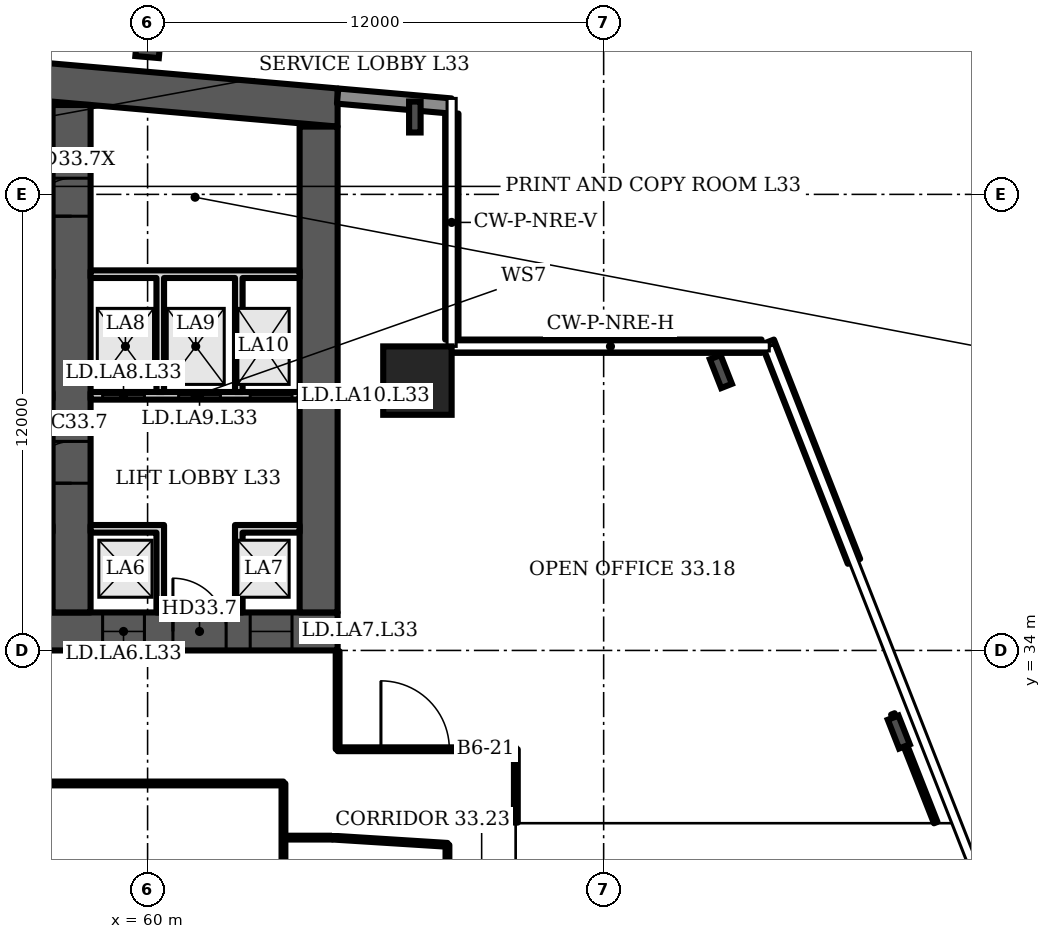
"""IFC4 building model, lengths in metres.
Left out: names, types, materials, properties, quantities, classifications, styles, units other than length and angle.
Written with IfcOpenShell. Run it as: python <this file> out.ifc"""

import sys

from ifc_helpers import new_model, si_unit, direction, frame, frame_2d, origin, origin_2d, place, context, subcontext, project, spatial, polyline, rectangle, i_section, outline, extrude, element, fill, save


model = new_model("IFC4")
c1 = context("Model", 3, precision=1e-05, world=origin(), true_north=direction((0.0, 1.0)))
c2 = subcontext(c1, "Body", "Model", "MODEL_VIEW")
j1 = project(units=[si_unit("LENGTHUNIT", "METRE"), si_unit("PLANEANGLEUNIT", "RADIAN")], contexts=[c1])
p1 = place(None, origin())
s1 = spatial("IfcSite", under=j1, at=p1, CompositionType="ELEMENT")
p2 = place(p1, origin())
s2 = spatial("IfcBuilding", under=s1, at=p2, CompositionType="ELEMENT")
p3 = place(p2, frame((0.0, 0.0, 139.9)))
s3 = spatial("IfcBuildingStorey", under=s2, at=p3, CompositionType="ELEMENT", Elevation=139.9)
p4 = place(p3, origin())
e1 = element("IfcWall", 1, at=p4, inside=s3, PredefinedType="SHEAR", context=c2, shape_type="SweptSolid", body=[
    extrude(outline(polyline([(16.0, 47.784), (40.5, 49.927), (65.0, 47.784), (65.0, 48.787), (40.5, 50.931), (16.0, 48.787), (16.0, 47.784)])), origin(), (0.0, 0.0, 1.0), 3.6),
])
p5 = place(p3, frame((16.0, 34.5, 0.0), z_axis=(0.0, 0.0, 1.0), x_axis=(1.0, 0.0, 0.0)))
e2 = element("IfcWall", 2, at=p5, inside=s3, PredefinedType="SHEAR", context=c2, shape_type="SweptSolid", body=[
    extrude(rectangle(XDim=49.0, YDim=1.0, at=frame_2d((24.5, 0.0))), origin(), (0.0, 0.0, 1.0), 3.6),
])
p6 = place(p5, frame((1.2, 0.0, 0.0)))
e3 = element("IfcOpeningElement", 3, at=p6, cuts=e2, PredefinedType="OPENING", context=c2, shape_type="SweptSolid", body=[
    extrude(rectangle(XDim=1.1, YDim=2.1, at=frame_2d((0.55, 1.05))), frame((0.0, 0.51, 0.0), z_axis=(0.0, -1.0, 0.0), x_axis=(1.0, 0.0, 0.0)), (0.0, 0.0, 1.0), 1.02),
])
p7 = place(p5, frame((5.083, 0.0, 0.0)))
e4 = element("IfcOpeningElement", 4, at=p7, cuts=e2, PredefinedType="OPENING", context=c2, shape_type="SweptSolid", body=[
    extrude(rectangle(XDim=1.1, YDim=2.1, at=frame_2d((0.55, 1.05))), frame((0.0, 0.51, 0.0), z_axis=(0.0, -1.0, 0.0), x_axis=(1.0, 0.0, 0.0)), (0.0, 0.0, 1.0), 1.02),
])
p8 = place(p5, frame((2.933, 0.0, 0.0)))
e5 = element("IfcOpeningElement", 5, at=p8, cuts=e2, PredefinedType="OPENING", context=c2, shape_type="SweptSolid", body=[
    extrude(rectangle(XDim=1.4, YDim=2.1, at=frame_2d((0.7, 1.05))), frame((0.0, 0.51, 0.0), z_axis=(0.0, -1.0, 0.0), x_axis=(1.0, 0.0, 0.0)), (0.0, 0.0, 1.0), 1.02),
])
p9 = place(p5, frame((7.65, 0.0, 0.0)))
e6 = element("IfcOpeningElement", 6, at=p9, cuts=e2, PredefinedType="OPENING", context=c2, shape_type="SweptSolid", body=[
    extrude(rectangle(XDim=1.2, YDim=2.1, at=frame_2d((0.6, 1.05))), frame((0.0, 0.51, 0.0), z_axis=(0.0, -1.0, 0.0), x_axis=(1.0, 0.0, 0.0)), (0.0, 0.0, 1.0), 1.02),
])
p10 = place(p5, frame((14.817, 0.0, 0.0)))
e7 = element("IfcOpeningElement", 7, at=p10, cuts=e2, PredefinedType="OPENING", context=c2, shape_type="SweptSolid", body=[
    extrude(rectangle(XDim=1.1, YDim=2.1, at=frame_2d((0.55, 1.05))), frame((0.0, 0.51, 0.0), z_axis=(0.0, -1.0, 0.0), x_axis=(1.0, 0.0, 0.0)), (0.0, 0.0, 1.0), 1.02),
])
p11 = place(p5, frame((19.083, 0.0, 0.0)))
e8 = element("IfcOpeningElement", 8, at=p11, cuts=e2, PredefinedType="OPENING", context=c2, shape_type="SweptSolid", body=[
    extrude(rectangle(XDim=1.1, YDim=2.1, at=frame_2d((0.55, 1.05))), frame((0.0, 0.51, 0.0), z_axis=(0.0, -1.0, 0.0), x_axis=(1.0, 0.0, 0.0)), (0.0, 0.0, 1.0), 1.02),
])
p12 = place(p5, frame((16.8, 0.0, 0.0)))
e9 = element("IfcOpeningElement", 9, at=p12, cuts=e2, PredefinedType="OPENING", context=c2, shape_type="SweptSolid", body=[
    extrude(rectangle(XDim=1.4, YDim=2.1, at=frame_2d((0.7, 1.05))), frame((0.0, 0.51, 0.0), z_axis=(0.0, -1.0, 0.0), x_axis=(1.0, 0.0, 0.0)), (0.0, 0.0, 1.0), 1.02),
])
p13 = place(p5, frame((21.817, 0.0, 0.0)))
e10 = element("IfcOpeningElement", 10, at=p13, cuts=e2, PredefinedType="OPENING", context=c2, shape_type="SweptSolid", body=[
    extrude(rectangle(XDim=1.1, YDim=2.1, at=frame_2d((0.55, 1.05))), frame((0.0, 0.51, 0.0), z_axis=(0.0, -1.0, 0.0), x_axis=(1.0, 0.0, 0.0)), (0.0, 0.0, 1.0), 1.02),
])
p14 = place(p5, frame((26.083, 0.0, 0.0)))
e11 = element("IfcOpeningElement", 11, at=p14, cuts=e2, PredefinedType="OPENING", context=c2, shape_type="SweptSolid", body=[
    extrude(rectangle(XDim=1.1, YDim=2.1, at=frame_2d((0.55, 1.05))), frame((0.0, 0.51, 0.0), z_axis=(0.0, -1.0, 0.0), x_axis=(1.0, 0.0, 0.0)), (0.0, 0.0, 1.0), 1.02),
])
p15 = place(p5, frame((33.15, 0.0, 0.0)))
e12 = element("IfcOpeningElement", 12, at=p15, cuts=e2, PredefinedType="OPENING", context=c2, shape_type="SweptSolid", body=[
    extrude(rectangle(XDim=1.2, YDim=2.1, at=frame_2d((0.6, 1.05))), frame((0.0, 0.51, 0.0), z_axis=(0.0, -1.0, 0.0), x_axis=(1.0, 0.0, 0.0)), (0.0, 0.0, 1.0), 1.02),
])
p16 = place(p5, frame((37.8, 0.0, 0.0)))
e13 = element("IfcOpeningElement", 13, at=p16, cuts=e2, PredefinedType="OPENING", context=c2, shape_type="SweptSolid", body=[
    extrude(rectangle(XDim=1.4, YDim=2.1, at=frame_2d((0.7, 1.05))), frame((0.0, 0.51, 0.0), z_axis=(0.0, -1.0, 0.0), x_axis=(1.0, 0.0, 0.0)), (0.0, 0.0, 1.0), 1.02),
])
p17 = place(p5, frame((42.817, 0.0, 0.0)))
e14 = element("IfcOpeningElement", 14, at=p17, cuts=e2, PredefinedType="OPENING", context=c2, shape_type="SweptSolid", body=[
    extrude(rectangle(XDim=1.1, YDim=2.1, at=frame_2d((0.55, 1.05))), frame((0.0, 0.51, 0.0), z_axis=(0.0, -1.0, 0.0), x_axis=(1.0, 0.0, 0.0)), (0.0, 0.0, 1.0), 1.02),
])
p18 = place(p5, frame((46.7, 0.0, 0.0)))
e15 = element("IfcOpeningElement", 15, at=p18, cuts=e2, PredefinedType="OPENING", context=c2, shape_type="SweptSolid", body=[
    extrude(rectangle(XDim=1.1, YDim=2.1, at=frame_2d((0.55, 1.05))), frame((0.0, 0.51, 0.0), z_axis=(0.0, -1.0, 0.0), x_axis=(1.0, 0.0, 0.0)), (0.0, 0.0, 1.0), 1.02),
])
p19 = place(p5, frame((44.667, 0.0, 0.0)))
e16 = element("IfcOpeningElement", 16, at=p19, cuts=e2, PredefinedType="OPENING", context=c2, shape_type="SweptSolid", body=[
    extrude(rectangle(XDim=1.4, YDim=2.1, at=frame_2d((0.7, 1.05))), frame((0.0, 0.51, 0.0), z_axis=(0.0, -1.0, 0.0), x_axis=(1.0, 0.0, 0.0)), (0.0, 0.0, 1.0), 1.02),
])
p20 = place(p3, frame((58.0, 35.0, 0.0), z_axis=(0.0, 0.0, 1.0), x_axis=(0.0, 1.0, 0.0)))
e17 = element("IfcWall", 17, at=p20, inside=s3, PredefinedType="SHEAR", context=c2, shape_type="SweptSolid", body=[
    extrude(rectangle(XDim=13.352, YDim=1.0, at=frame_2d((6.676, 0.0))), origin(), (0.0, 0.0, 1.0), 3.6),
])
p21 = place(p20, frame((10.426, 0.0, 0.0)))
e18 = element("IfcOpeningElement", 18, at=p21, cuts=e17, PredefinedType="OPENING", context=c2, shape_type="SweptSolid", body=[
    extrude(rectangle(XDim=1.0, YDim=2.1, at=frame_2d((0.5, 1.05))), frame((0.0, 0.51, 0.0), z_axis=(0.0, -1.0, 0.0), x_axis=(1.0, 0.0, 0.0)), (0.0, 0.0, 1.0), 1.02),
])
p22 = place(p20, frame((3.4, 0.0, 0.0)))
e19 = element("IfcOpeningElement", 19, at=p22, cuts=e17, PredefinedType="OPENING", context=c2, shape_type="SweptSolid", body=[
    extrude(rectangle(XDim=1.1, YDim=2.1, at=frame_2d((0.55, 1.05))), frame((0.0, 0.51, 0.0), z_axis=(0.0, -1.0, 0.0), x_axis=(1.0, 0.0, 0.0)), (0.0, 0.0, 1.0), 1.02),
])
p23 = place(p3, frame((64.5, 35.0, 0.0), z_axis=(0.0, 0.0, 1.0), x_axis=(0.0, 1.0, 0.0)))
e20 = element("IfcWall", 20, at=p23, inside=s3, PredefinedType="SHEAR", context=c2, shape_type="SweptSolid", body=[
    extrude(rectangle(XDim=12.784, YDim=1.0, at=frame_2d((6.392, 0.0))), origin(), (0.0, 0.0, 1.0), 3.6),
])
p24 = place(p3, frame((67.1, 41.1, 0.0), z_axis=(0.0, 0.0, 1.0), x_axis=(1.0, 0.0, 0.0)))
e21 = element("IfcColumn", 21, at=p24, inside=s3, PredefinedType="COLUMN", context=c2, shape_type="SweptSolid", body=[
    extrude(rectangle(XDim=1.8, YDim=1.8, at=origin_2d()), origin(), (0.0, 0.0, 1.0), 3.6),
])
for number, where, z_axis, x_axis in (
    (22, (79.766, 31.853, 0.0), (0.0, 0.0, 1.0), (0.931, 0.366, 0.0)),
    (23, (75.085, 41.338, 0.0), (0.0, 0.0, 1.0), (0.931, 0.366, 0.0)),
    (24, (67.032, 48.036, 0.0), (0.0, 0.0, 1.0), (1.0, 0.0, 0.0)),
):
    element("IfcColumn", number, at=place(p3, frame(where, z_axis=z_axis, x_axis=x_axis)), inside=s3, PredefinedType="COLUMN", context=c2, shape_type="SweptSolid", body=[
        extrude(i_section(OverallWidth=0.303, OverallDepth=0.814, WebThickness=0.021, FlangeThickness=0.04, FilletRadius=0.03, at=origin_2d()), origin(), (0.0, 0.0, 1.0), 3.6),
    ])
p25 = place(p3, frame((60.0, 49.765, 0.0), z_axis=(0.0, 0.0, 1.0), x_axis=(0.087156, 0.996198, 0.0)))
e25 = element("IfcColumn", 25, at=p25, inside=s3, PredefinedType="COLUMN", context=c2, shape_type="SweptSolid", body=[
    extrude(i_section(OverallWidth=0.305, OverallDepth=0.62, WebThickness=0.021, FlangeThickness=0.04, FilletRadius=0.027, at=origin_2d()), origin(), (0.0, 0.0, 1.0), 3.6),
])
p26 = place(p3, frame((67.983, 48.326, 0.0), z_axis=(0.0, 0.0, 1.0), x_axis=(-0.996194, 0.087168, 0.0)))
e26 = element("IfcWall", 26, at=p26, inside=s3, PredefinedType="SOLIDWALL", context=c2, shape_type="SweptSolid", body=[
    extrude(rectangle(XDim=2.994, YDim=0.4, at=frame_2d((1.497, 0.0))), origin(), (0.0, 0.0, 1.0), 3.2),
])
p27 = place(p3, frame((78.586, 36.344, 0.0), z_axis=(0.0, 0.0, 1.0), x_axis=(-0.365792, 0.930699, 0.0)))
e27 = element("IfcWall", 27, at=p27, inside=s3, PredefinedType="SOLIDWALL", context=c2, shape_type="SweptSolid", body=[
    extrude(rectangle(XDim=6.202, YDim=0.35, at=frame_2d((3.101, 0.0))), origin(), (0.0, 0.0, 1.0), 1.0),
])
p28 = place(p3, frame((76.155, 42.005, 0.0), z_axis=(0.0, 0.0, 1.0), x_axis=(-1.0, 0.0, 0.0)))
e28 = element("IfcWall", 28, at=p28, inside=s3, PredefinedType="SOLIDWALL", context=c2, shape_type="SweptSolid", body=[
    extrude(rectangle(XDim=8.155, YDim=0.35, at=frame_2d((4.078, 0.0))), origin(), (0.0, 0.0, 1.0), 1.0),
])
p29 = place(p3, frame((68.005, 42.18, 0.0), z_axis=(0.0, 0.0, 1.0), x_axis=(0.0, 1.0, 0.0)))
e29 = element("IfcWall", 29, at=p29, inside=s3, PredefinedType="SOLIDWALL", context=c2, shape_type="SweptSolid", body=[
    extrude(rectangle(XDim=5.947, YDim=0.35, at=frame_2d((2.973, 0.0))), origin(), (0.0, 0.0, 1.0), 1.0),
])
p30 = place(p3, frame((58.5, 40.7, 0.0), z_axis=(0.0, 0.0, 1.0), x_axis=(1.0, 0.0, 0.0)))
e30 = element("IfcWall", 30, at=p30, inside=s3, PredefinedType="PARTITIONING", context=c2, shape_type="SweptSolid", body=[
    extrude(rectangle(XDim=5.5, YDim=0.2, at=frame_2d((2.75, 0.0))), origin(), (0.0, 0.0, 1.0), 3.2),
])
p31 = place(p30, frame((0.317, 0.0, 0.0)))
e31 = element("IfcOpeningElement", 31, at=p31, cuts=e30, PredefinedType="OPENING", context=c2, shape_type="SweptSolid", body=[
    extrude(rectangle(XDim=1.1, YDim=2.1, at=frame_2d((0.55, 1.05))), frame((0.0, 0.11, 0.0), z_axis=(0.0, -1.0, 0.0), x_axis=(1.0, 0.0, 0.0)), (0.0, 0.0, 1.0), 0.22),
])
p32 = place(p30, frame((2.317, 0.0, 0.0)))
e32 = element("IfcOpeningElement", 32, at=p32, cuts=e30, PredefinedType="OPENING", context=c2, shape_type="SweptSolid", body=[
    extrude(rectangle(XDim=1.1, YDim=2.1, at=frame_2d((0.55, 1.05))), frame((0.0, 0.11, 0.0), z_axis=(0.0, -1.0, 0.0), x_axis=(1.0, 0.0, 0.0)), (0.0, 0.0, 1.0), 0.22),
])
p33 = place(p30, frame((4.2, 0.0, 0.0)))
e33 = element("IfcOpeningElement", 33, at=p33, cuts=e30, PredefinedType="OPENING", context=c2, shape_type="SweptSolid", body=[
    extrude(rectangle(XDim=1.1, YDim=2.1, at=frame_2d((0.55, 1.05))), frame((0.0, 0.11, 0.0), z_axis=(0.0, -1.0, 0.0), x_axis=(1.0, 0.0, 0.0)), (0.0, 0.0, 1.0), 0.22),
])
p34 = place(p3, origin())
e34 = element("IfcWall", 34, at=p34, inside=s3, PredefinedType="PARTITIONING", context=c2, shape_type="SweptSolid", body=[
    extrude(outline(polyline([(60.233, 37.1), (58.5, 37.1), (58.5, 37.3), (60.233, 37.3), (60.433, 37.3), (60.433, 35.0), (60.233, 35.0), (60.233, 37.1)])), origin(), (0.0, 0.0, 1.0), 3.2),
])
p35 = place(p3, origin())
e35 = element("IfcWall", 35, at=p35, inside=s3, PredefinedType="PARTITIONING", context=c2, shape_type="SweptSolid", body=[
    extrude(outline(polyline([(62.3, 37.3), (62.5, 37.3), (64.0, 37.3), (64.0, 37.1), (62.5, 37.1), (62.5, 35.0), (62.3, 35.0), (62.3, 37.3)])), origin(), (0.0, 0.0, 1.0), 3.2),
])
p36 = place(p3, origin())
e36 = element("IfcWall", 36, at=p36, inside=s3, PredefinedType="PARTITIONING", context=c2, shape_type="SweptSolid", body=[
    extrude(outline(polyline([(60.433, 40.8), (60.233, 40.8), (60.233, 43.8), (58.5, 43.8), (58.5, 44.0), (64.0, 44.0), (64.0, 43.8), (62.5, 43.8), (62.5, 40.8), (62.3, 40.8), (62.3, 43.8), (60.433, 43.8), (60.433, 40.8)])), origin(), (0.0, 0.0, 1.0), 3.2),
])
p37 = place(p3, frame((63.575, 14.53, 0.0), z_axis=(0.0, 0.0, 1.0), x_axis=(0.0, 1.0, 0.0)))
e37 = element("IfcWall", 37, at=p37, inside=s3, PredefinedType="PARTITIONING", context=c2, shape_type="SweptSolid", body=[
    extrude(rectangle(XDim=15.97, YDim=0.1, at=frame_2d((7.985, 0.0))), origin(), (0.0, 0.0, 1.0), 3.2),
])
p38 = place(p3, frame((63.575, 29.075, 0.0), z_axis=(0.0, 0.0, 1.0), x_axis=(1.0, 0.0, 0.0)))
e38 = element("IfcWall", 38, at=p38, inside=s3, PredefinedType="PARTITIONING", context=c2, shape_type="SweptSolid", body=[
    extrude(rectangle(XDim=1.285, YDim=0.1, at=frame_2d((0.643, 0.0))), origin(), (0.0, 0.0, 1.0), 3.2),
])
p39 = place(p3, frame((65.0, 31.4, 0.0), z_axis=(0.0, 0.0, 1.0), x_axis=(0.0, 1.0, 0.0)))
e39 = element("IfcWall", 39, at=p39, inside=s3, PredefinedType="PARTITIONING", context=c2, shape_type="SweptSolid", body=[
    extrude(rectangle(XDim=2.58, YDim=0.1, at=frame_2d((1.29, 0.0))), origin(), (0.0, 0.0, 1.0), 3.2),
])
p40 = place(p3, frame((65.0, 31.4, 0.0), z_axis=(0.0, 0.0, 1.0), x_axis=(1.0, 0.0, 0.0)))
e40 = element("IfcWall", 40, at=p40, inside=s3, PredefinedType="PARTITIONING", context=c2, shape_type="SweptSolid", body=[
    extrude(rectangle(XDim=4.69, YDim=0.1, at=frame_2d((2.345, 0.0))), origin(), (0.0, 0.0, 1.0), 3.2),
])
p41 = place(p40, frame((1.14, 0.0, 0.0)))
e41 = element("IfcOpeningElement", 41, at=p41, cuts=e40, PredefinedType="OPENING", context=c2, shape_type="SweptSolid", body=[
    extrude(rectangle(XDim=1.8, YDim=2.1, at=frame_2d((0.9, 1.05))), frame((0.0, 0.06, 0.0), z_axis=(0.0, -1.0, 0.0), x_axis=(1.0, 0.0, 0.0)), (0.0, 0.0, 1.0), 0.12),
])
p42 = place(p3, frame((67.89, 24.65, 0.0), z_axis=(0.0, 0.0, 1.0), x_axis=(0.0, 1.0, 0.0)))
e42 = element("IfcWall", 42, at=p42, inside=s3, PredefinedType="PARTITIONING", context=c2, shape_type="SweptSolid", body=[
    extrude(rectangle(XDim=4.235, YDim=0.1, at=frame_2d((2.118, 0.0))), origin(), (0.0, 0.0, 1.0), 3.2),
])
p43 = place(p3, frame((67.89, 28.885, 0.0), z_axis=(0.0, 0.0, 1.0), x_axis=(-0.998031, 0.062786, 0.0)))
e43 = element("IfcWall", 43, at=p43, inside=s3, PredefinedType="PARTITIONING", context=c2, shape_type="SweptSolid", body=[
    extrude(rectangle(XDim=3.021, YDim=0.1, at=frame_2d((1.511, 0.0))), origin(), (0.0, 0.0, 1.0), 3.2),
])
p44 = place(p3, frame((69.69, 29.47, 0.0), z_axis=(0.0, 0.0, 1.0), x_axis=(0.0, 1.0, 0.0)))
e44 = element("IfcWall", 44, at=p44, inside=s3, PredefinedType="PARTITIONING", context=c2, shape_type="SweptSolid", body=[
    extrude(rectangle(XDim=1.93, YDim=0.1, at=frame_2d((0.965, 0.0))), origin(), (0.0, 0.0, 1.0), 3.2),
])
p45 = place(p3, frame((80.737, 29.47, 0.0), z_axis=(0.0, 0.0, 1.0), x_axis=(-0.366592, 0.930378, 0.0)))
e45 = element("IfcWall", 45, at=p45, inside=s3, PredefinedType="PARTITIONING", context=c2, shape_type="SweptSolid", body=[
    extrude(rectangle(XDim=3.074, YDim=0.1, at=frame_2d((1.537, 0.0))), origin(), (0.0, 0.0, 1.0), 2.58),
])
p46 = place(p3, frame((44.15, 30.5, 0.0), z_axis=(0.0, 0.0, 1.0), x_axis=(1.0, 0.0, 0.0)))
e46 = element("IfcWall", 46, at=p46, inside=s3, PredefinedType="PARTITIONING", context=c2, shape_type="SweptSolid", body=[
    extrude(rectangle(XDim=19.425, YDim=0.1, at=frame_2d((9.712, 0.0))), origin(), (0.0, 0.0, 1.0), 3.2),
])
p47 = place(p17, origin())
e47 = element("IfcDoor", 47, at=p47, inside=s3, OperationType="DOUBLE_DOOR_SLIDING", PredefinedType="DOOR", context=c2, shape_type="SweptSolid", body=[
    extrude(rectangle(XDim=1.1, YDim=2.1, at=frame_2d((0.55, 1.05))), frame((0.0, 0.025, 0.0), z_axis=(0.0, -1.0, 0.0), x_axis=(1.0, 0.0, 0.0)), (0.0, 0.0, 1.0), 0.05),
])
fill(e14, e47)
p48 = place(p18, origin())
e48 = element("IfcDoor", 48, at=p48, inside=s3, OperationType="DOUBLE_DOOR_SLIDING", PredefinedType="DOOR", context=c2, shape_type="SweptSolid", body=[
    extrude(rectangle(XDim=1.1, YDim=2.1, at=frame_2d((0.55, 1.05))), frame((0.0, 0.025, 0.0), z_axis=(0.0, -1.0, 0.0), x_axis=(1.0, 0.0, 0.0)), (0.0, 0.0, 1.0), 0.05),
])
fill(e15, e48)
p49 = place(p19, origin())
e49 = element("IfcDoor", 49, at=p49, inside=s3, OperationType="DOUBLE_DOOR_SINGLE_SWING", PredefinedType="DOOR", context=c2, shape_type="SweptSolid", body=[
    extrude(rectangle(XDim=1.4, YDim=2.1, at=frame_2d((0.7, 1.05))), frame((0.0, 0.025, 0.0), z_axis=(0.0, -1.0, 0.0), x_axis=(1.0, 0.0, 0.0)), (0.0, 0.0, 1.0), 0.05),
])
fill(e16, e49)
p50 = place(p31, origin())
e50 = element("IfcDoor", 50, at=p50, inside=s3, OperationType="DOUBLE_DOOR_SLIDING", PredefinedType="DOOR", context=c2, shape_type="SweptSolid", body=[
    extrude(rectangle(XDim=1.1, YDim=2.1, at=frame_2d((0.55, 1.05))), frame((0.0, 0.025, 0.0), z_axis=(0.0, -1.0, 0.0), x_axis=(1.0, 0.0, 0.0)), (0.0, 0.0, 1.0), 0.05),
])
fill(e31, e50)
p51 = place(p32, origin())
e51 = element("IfcDoor", 51, at=p51, inside=s3, OperationType="DOUBLE_DOOR_SLIDING", PredefinedType="DOOR", context=c2, shape_type="SweptSolid", body=[
    extrude(rectangle(XDim=1.1, YDim=2.1, at=frame_2d((0.55, 1.05))), frame((0.0, 0.025, 0.0), z_axis=(0.0, -1.0, 0.0), x_axis=(1.0, 0.0, 0.0)), (0.0, 0.0, 1.0), 0.05),
])
fill(e32, e51)
p52 = place(p33, origin())
e52 = element("IfcDoor", 52, at=p52, inside=s3, OperationType="DOUBLE_DOOR_SLIDING", PredefinedType="DOOR", context=c2, shape_type="SweptSolid", body=[
    extrude(rectangle(XDim=1.1, YDim=2.1, at=frame_2d((0.55, 1.05))), frame((0.0, 0.025, 0.0), z_axis=(0.0, -1.0, 0.0), x_axis=(1.0, 0.0, 0.0)), (0.0, 0.0, 1.0), 0.05),
])
fill(e33, e52)
p53 = place(p21, origin())
e53 = element("IfcDoor", 53, at=p53, inside=s3, OperationType="SINGLE_SWING_LEFT", PredefinedType="DOOR", context=c2, shape_type="SweptSolid", body=[
    extrude(rectangle(XDim=1.0, YDim=2.1, at=frame_2d((0.5, 1.05))), frame((0.0, 0.5, 0.0), z_axis=(0.0, -1.0, 0.0), x_axis=(1.0, 0.0, 0.0)), (0.0, 0.0, 1.0), 1.0),
])
fill(e18, e53)
p54 = place(p22, origin())
e54 = element("IfcDoor", 54, at=p54, inside=s3, OperationType="SINGLE_SWING_LEFT", PredefinedType="DOOR", context=c2, shape_type="SweptSolid", body=[
    extrude(rectangle(XDim=1.1, YDim=2.1, at=frame_2d((0.55, 1.05))), frame((0.0, 0.025, 0.0), z_axis=(0.0, -1.0, 0.0), x_axis=(1.0, 0.0, 0.0)), (0.0, 0.0, 1.0), 0.05),
])
fill(e19, e54)
p55 = place(p41, origin())
e55 = element("IfcDoor", 55, at=p55, inside=s3, OperationType="DOUBLE_DOOR_SINGLE_SWING", PredefinedType="DOOR", context=c2, shape_type="SweptSolid", body=[
    extrude(rectangle(XDim=1.8, YDim=2.1, at=frame_2d((0.9, 1.05))), frame((0.0, 0.025, 0.0), z_axis=(0.0, -1.0, 0.0), x_axis=(1.0, 0.0, 0.0)), (0.0, 0.0, 1.0), 0.05),
])
fill(e41, e55)
save(model, sys.argv[1])
